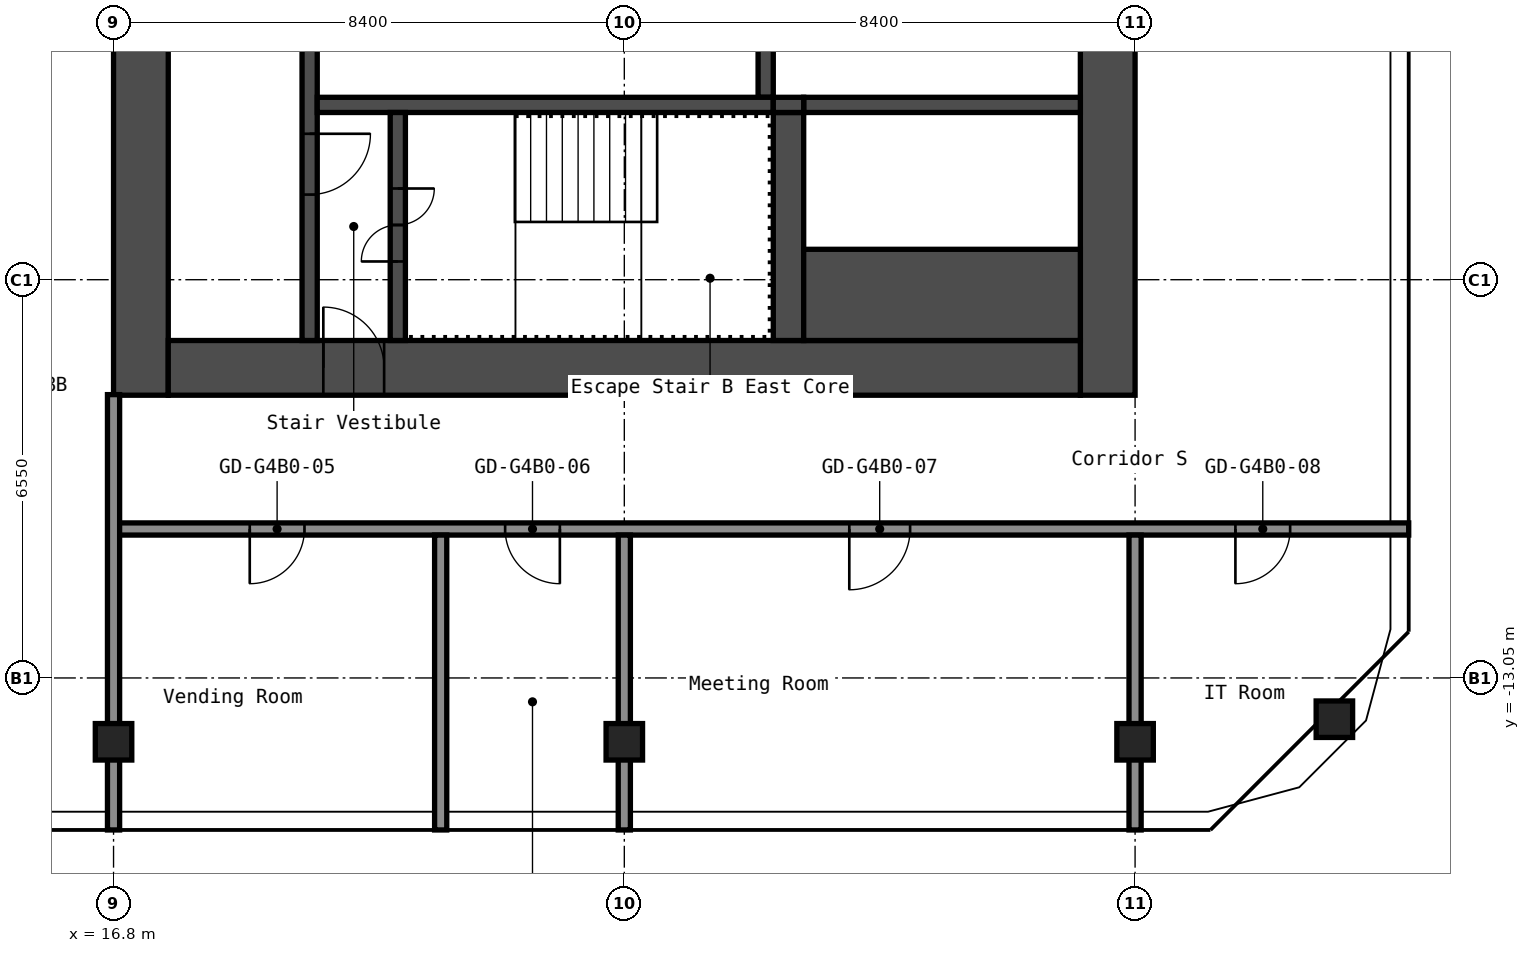
"""IFC4 building model, lengths in metres.
Left out: names, types, materials, properties, quantities, classifications, styles, units other than length and angle.
Written with IfcOpenShell. Run it as: python <this file> out.ifc"""

import sys

from ifc_helpers import new_model, si_unit, direction, frame, frame_2d, origin, origin_2d, place, context, subcontext, project, spatial, rectangle, hollow_rectangle, extrude, element, fill, save


model = new_model("IFC4")
c1 = context("Model", 3, precision=1e-05, world=origin(), true_north=direction((0.0, 1.0)))
c2 = subcontext(c1, "Body", "Model", "MODEL_VIEW")
j1 = project(units=[si_unit("LENGTHUNIT", "METRE"), si_unit("PLANEANGLEUNIT", "RADIAN")], contexts=[c1])
p1 = place(None, origin())
s1 = spatial("IfcSite", under=j1, at=p1, CompositionType="ELEMENT")
p2 = place(p1, origin())
s2 = spatial("IfcBuilding", under=s1, at=p2, CompositionType="ELEMENT")
p3 = place(p2, frame((0.0, 0.0, 189.8)))
s3 = spatial("IfcBuildingStorey", under=s2, at=p3, CompositionType="ELEMENT", Elevation=189.8)
for number, where, z_axis, x_axis in (
    (1, (16.8, -14.1, 0.0), (0.0, 0.0, 1.0), (1.0, 0.0, 0.0)),
    (2, (25.2, -14.1, 0.0), (0.0, 0.0, 1.0), (1.0, 0.0, 0.0)),
    (3, (33.6, -14.1, 0.0), (0.0, 0.0, 1.0), (1.0, 0.0, 0.0)),
    (4, (36.878, -13.729, 0.0), (0.0, 0.0, 1.0), (1.0, 0.0, 0.0)),
):
    element("IfcColumn", number, at=place(p3, frame(where, z_axis=z_axis, x_axis=x_axis)), inside=s3, PredefinedType="COLUMN", context=c2, shape_type="SweptSolid", body=[
        extrude(hollow_rectangle(XDim=0.6, YDim=0.6, WallThickness=0.025, InnerFilletRadius=0.038, OuterFilletRadius=0.062, at=origin_2d()), origin(), (0.0, 0.0, 1.0), 2.75),
    ])
p4 = place(p3, frame((17.25, -8.4, 0.0), z_axis=(0.0, 0.0, 1.0), x_axis=(0.0, 1.0, 0.0)))
e5 = element("IfcWall", 5, at=p4, inside=s3, PredefinedType="SHEAR", context=c2, shape_type="SweptSolid", body=[
    extrude(rectangle(XDim=16.8, YDim=0.9, at=frame_2d((8.4, 0.0))), origin(), (0.0, 0.0, 1.0), 2.75),
])
p5 = place(p4, frame((10.1, 0.0, 0.0)))
e6 = element("IfcOpeningElement", 6, at=p5, cuts=e5, PredefinedType="OPENING", context=c2, shape_type="SweptSolid", body=[
    extrude(rectangle(XDim=1.6, YDim=2.1, at=frame_2d((0.8, 1.05))), frame((0.0, 0.46, 0.0), z_axis=(0.0, -1.0, 0.0), x_axis=(1.0, 0.0, 0.0)), (0.0, 0.0, 1.0), 0.92),
])
p6 = place(p3, frame((33.15, -8.4, 0.0), z_axis=(0.0, 0.0, 1.0), x_axis=(0.0, 1.0, 0.0)))
e7 = element("IfcWall", 7, at=p6, inside=s3, PredefinedType="SHEAR", context=c2, shape_type="SweptSolid", body=[
    extrude(rectangle(XDim=16.8, YDim=0.9, at=frame_2d((8.4, 0.0))), origin(), (0.0, 0.0, 1.0), 2.75),
])
p7 = place(p3, frame((17.7, -7.95, 0.0), z_axis=(0.0, 0.0, 1.0), x_axis=(1.0, 0.0, 0.0)))
e8 = element("IfcWall", 8, at=p7, inside=s3, PredefinedType="SHEAR", context=c2, shape_type="SweptSolid", body=[
    extrude(rectangle(XDim=15.0, YDim=0.9, at=frame_2d((7.5, 0.0))), origin(), (0.0, 0.0, 1.0), 2.75),
])
p8 = place(p7, frame((2.55, 0.0, 0.0)))
e9 = element("IfcOpeningElement", 9, at=p8, cuts=e8, PredefinedType="OPENING", context=c2, shape_type="SweptSolid", body=[
    extrude(rectangle(XDim=1.0, YDim=2.1, at=frame_2d((0.5, 1.05))), frame((0.0, 0.46, 0.0), z_axis=(0.0, -1.0, 0.0), x_axis=(1.0, 0.0, 0.0)), (0.0, 0.0, 1.0), 0.92),
])
p9 = place(p3, frame((20.025, -7.5, 0.0), z_axis=(0.0, 0.0, 1.0), x_axis=(0.0, 1.0, 0.0)))
e10 = element("IfcWall", 10, at=p9, inside=s3, PredefinedType="SHEAR", context=c2, shape_type="SweptSolid", body=[
    extrude(rectangle(XDim=6.3, YDim=0.25, at=frame_2d((3.15, 0.0))), origin(), (0.0, 0.0, 1.0), 2.75),
])
p10 = place(p9, frame((2.4, 0.0, 0.0)))
e11 = element("IfcOpeningElement", 11, at=p10, cuts=e10, PredefinedType="OPENING", context=c2, shape_type="SweptSolid", body=[
    extrude(rectangle(XDim=1.0, YDim=2.1, at=frame_2d((0.5, 1.05))), frame((0.0, 0.135, 0.0), z_axis=(0.0, -1.0, 0.0), x_axis=(1.0, 0.0, 0.0)), (0.0, 0.0, 1.0), 0.27),
])
p11 = place(p3, frame((27.525, -3.5, 0.0), z_axis=(0.0, 0.0, 1.0), x_axis=(0.0, 1.0, 0.0)))
e12 = element("IfcWall", 12, at=p11, inside=s3, PredefinedType="SHEAR", context=c2, shape_type="SweptSolid", body=[
    extrude(rectangle(XDim=2.05, YDim=0.25, at=frame_2d((1.025, 0.0))), origin(), (0.0, 0.0, 1.0), 2.75),
])
p12 = place(p3, frame((20.15, -3.625, 0.0), z_axis=(0.0, 0.0, 1.0), x_axis=(1.0, 0.0, 0.0)))
e13 = element("IfcWall", 13, at=p12, inside=s3, PredefinedType="SHEAR", context=c2, shape_type="SweptSolid", body=[
    extrude(rectangle(XDim=7.5, YDim=0.25, at=frame_2d((3.75, 0.0))), origin(), (0.0, 0.0, 1.0), 2.75),
])
p13 = place(p3, frame((21.475, -7.5, 0.0), z_axis=(0.0, 0.0, 1.0), x_axis=(0.0, 1.0, 0.0)))
e14 = element("IfcWall", 14, at=p13, inside=s3, PredefinedType="SHEAR", context=c2, shape_type="SweptSolid", body=[
    extrude(rectangle(XDim=3.75, YDim=0.25, at=frame_2d((1.875, 0.0))), origin(), (0.0, 0.0, 1.0), 2.75),
])
p14 = place(p13, frame((1.3, 0.0, 0.0)))
e15 = element("IfcOpeningElement", 15, at=p14, cuts=e14, PredefinedType="OPENING", context=c2, shape_type="SweptSolid", body=[
    extrude(rectangle(XDim=1.2, YDim=2.1, at=frame_2d((0.6, 1.05))), frame((0.0, 0.135, 0.0), z_axis=(0.0, -1.0, 0.0), x_axis=(1.0, 0.0, 0.0)), (0.0, 0.0, 1.0), 0.27),
])
p15 = place(p3, frame((27.9, -7.5, 0.0), z_axis=(0.0, 0.0, 1.0), x_axis=(0.0, 1.0, 0.0)))
e16 = element("IfcWall", 16, at=p15, inside=s3, PredefinedType="SHEAR", context=c2, shape_type="SweptSolid", body=[
    extrude(rectangle(XDim=3.75, YDim=0.5, at=frame_2d((1.875, 0.0))), origin(), (0.0, 0.0, 1.0), 2.75),
])
p16 = place(p3, frame((28.15, -3.625, 0.0), z_axis=(0.0, 0.0, 1.0), x_axis=(1.0, 0.0, 0.0)))
e17 = element("IfcWall", 17, at=p16, inside=s3, PredefinedType="SHEAR", context=c2, shape_type="SweptSolid", body=[
    extrude(rectangle(XDim=4.55, YDim=0.25, at=frame_2d((2.275, 0.0))), origin(), (0.0, 0.0, 1.0), 2.75),
])
p17 = place(p3, frame((28.15, -6.75, 0.0), z_axis=(0.0, 0.0, 1.0), x_axis=(1.0, 0.0, 0.0)))
e18 = element("IfcWall", 18, at=p17, inside=s3, PredefinedType="SHEAR", context=c2, shape_type="SweptSolid", body=[
    extrude(rectangle(XDim=4.55, YDim=1.5, at=frame_2d((2.275, 0.0))), origin(), (0.0, 0.0, 1.0), 2.75),
])
p18 = place(p3, frame((27.65, -3.625, 0.0), z_axis=(0.0, 0.0, 1.0), x_axis=(1.0, 0.0, 0.0)))
e19 = element("IfcWall", 19, at=p18, inside=s3, PredefinedType="SHEAR", context=c2, shape_type="SweptSolid", body=[
    extrude(rectangle(XDim=0.5, YDim=0.25, at=frame_2d((0.25, 0.0))), origin(), (0.0, 0.0, 1.0), 2.75),
])
p19 = place(p3, frame((16.8, -10.6, 0.0), z_axis=(0.0, 0.0, 1.0), x_axis=(1.0, 0.0, 0.0)))
e20 = element("IfcWall", 20, at=p19, inside=s3, PredefinedType="PARTITIONING", context=c2, shape_type="SweptSolid", body=[
    extrude(rectangle(XDim=21.3, YDim=0.2, at=frame_2d((10.65, 0.0))), origin(), (0.0, 0.0, 1.0), 2.75),
])
p20 = place(p19, frame((2.24, 0.0, 0.0)))
e21 = element("IfcOpeningElement", 21, at=p20, cuts=e20, PredefinedType="OPENING", context=c2, shape_type="SweptSolid", body=[
    extrude(rectangle(XDim=0.9, YDim=2.1, at=frame_2d((0.45, 1.05))), frame((0.0, 0.11, 0.0), z_axis=(0.0, -1.0, 0.0), x_axis=(1.0, 0.0, 0.0)), (0.0, 0.0, 1.0), 0.22),
])
p21 = place(p19, frame((6.44, 0.0, 0.0)))
e22 = element("IfcOpeningElement", 22, at=p21, cuts=e20, PredefinedType="OPENING", context=c2, shape_type="SweptSolid", body=[
    extrude(rectangle(XDim=0.9, YDim=2.1, at=frame_2d((0.45, 1.05))), frame((0.0, 0.11, 0.0), z_axis=(0.0, -1.0, 0.0), x_axis=(1.0, 0.0, 0.0)), (0.0, 0.0, 1.0), 0.22),
])
p22 = place(p19, frame((12.1, 0.0, 0.0)))
e23 = element("IfcOpeningElement", 23, at=p22, cuts=e20, PredefinedType="OPENING", context=c2, shape_type="SweptSolid", body=[
    extrude(rectangle(XDim=1.0, YDim=2.1, at=frame_2d((0.5, 1.05))), frame((0.0, 0.11, 0.0), z_axis=(0.0, -1.0, 0.0), x_axis=(1.0, 0.0, 0.0)), (0.0, 0.0, 1.0), 0.22),
])
p23 = place(p19, frame((18.45, 0.0, 0.0)))
e24 = element("IfcOpeningElement", 24, at=p23, cuts=e20, PredefinedType="OPENING", context=c2, shape_type="SweptSolid", body=[
    extrude(rectangle(XDim=0.9, YDim=2.1, at=frame_2d((0.45, 1.05))), frame((0.0, 0.11, 0.0), z_axis=(0.0, -1.0, 0.0), x_axis=(1.0, 0.0, 0.0)), (0.0, 0.0, 1.0), 0.22),
])
p24 = place(p3, frame((16.8, -15.55, 0.0), z_axis=(0.0, 0.0, 1.0), x_axis=(0.0, 1.0, 0.0)))
e25 = element("IfcWall", 25, at=p24, inside=s3, PredefinedType="PARTITIONING", context=c2, shape_type="SweptSolid", body=[
    extrude(rectangle(XDim=7.16, YDim=0.2, at=frame_2d((3.58, 0.0))), origin(), (0.0, 0.0, 1.0), 2.75),
])
for number, where, z_axis, x_axis in (
    (26, (22.18, -15.55, 0.0), (0.0, 0.0, 1.0), (0.0, 1.0, 0.0)),
    (27, (25.2, -15.55, 0.0), (0.0, 0.0, 1.0), (0.0, 1.0, 0.0)),
    (28, (33.6, -15.55, 0.0), (0.0, 0.0, 1.0), (0.0, 1.0, 0.0)),
):
    element("IfcWall", number, at=place(p3, frame(where, z_axis=z_axis, x_axis=x_axis)), inside=s3, PredefinedType="PARTITIONING", context=c2, shape_type="SweptSolid", body=[
        extrude(rectangle(XDim=4.85, YDim=0.2, at=frame_2d((2.425, 0.0))), origin(), (0.0, 0.0, 1.0), 2.75),
    ])
p25 = place(p8, origin())
e29 = element("IfcDoor", 29, at=p25, inside=s3, OperationType="SINGLE_SWING_RIGHT", PredefinedType="DOOR", context=c2, shape_type="SweptSolid", body=[
    extrude(rectangle(XDim=1.0, YDim=2.1, at=frame_2d((0.5, 1.05))), frame((0.0, 0.025, 0.0), z_axis=(0.0, -1.0, 0.0), x_axis=(1.0, 0.0, 0.0)), (0.0, 0.0, 1.0), 0.05),
])
fill(e9, e29)
p26 = place(p14, origin())
e30 = element("IfcDoor", 30, at=p26, inside=s3, OperationType="DOUBLE_DOOR_SINGLE_SWING", PredefinedType="DOOR", context=c2, shape_type="SweptSolid", body=[
    extrude(rectangle(XDim=1.2, YDim=2.1, at=frame_2d((0.6, 1.05))), frame((0.0, 0.025, 0.0), z_axis=(0.0, -1.0, 0.0), x_axis=(1.0, 0.0, 0.0)), (0.0, 0.0, 1.0), 0.05),
])
fill(e15, e30)
p27 = place(p10, origin())
e31 = element("IfcDoor", 31, at=p27, inside=s3, OperationType="SINGLE_SWING_RIGHT", PredefinedType="DOOR", context=c2, shape_type="SweptSolid", body=[
    extrude(rectangle(XDim=1.0, YDim=2.1, at=frame_2d((0.5, 1.05))), frame((0.0, 0.025, 0.0), z_axis=(0.0, -1.0, 0.0), x_axis=(1.0, 0.0, 0.0)), (0.0, 0.0, 1.0), 0.05),
])
fill(e11, e31)
p28 = place(p20, origin())
e32 = element("IfcDoor", 32, at=p28, inside=s3, OperationType="SINGLE_SWING_LEFT", PredefinedType="DOOR", context=c2, shape_type="SweptSolid", body=[
    extrude(rectangle(XDim=0.9, YDim=2.1, at=frame_2d((0.45, 1.05))), frame((0.0, 0.025, 0.0), z_axis=(0.0, -1.0, 0.0), x_axis=(1.0, 0.0, 0.0)), (0.0, 0.0, 1.0), 0.05),
])
fill(e21, e32)
p29 = place(p21, origin())
e33 = element("IfcDoor", 33, at=p29, inside=s3, OperationType="SINGLE_SWING_RIGHT", PredefinedType="DOOR", context=c2, shape_type="SweptSolid", body=[
    extrude(rectangle(XDim=0.9, YDim=2.1, at=frame_2d((0.45, 1.05))), frame((0.0, 0.025, 0.0), z_axis=(0.0, -1.0, 0.0), x_axis=(1.0, 0.0, 0.0)), (0.0, 0.0, 1.0), 0.05),
])
fill(e22, e33)
p30 = place(p22, origin())
e34 = element("IfcDoor", 34, at=p30, inside=s3, OperationType="SINGLE_SWING_LEFT", PredefinedType="DOOR", context=c2, shape_type="SweptSolid", body=[
    extrude(rectangle(XDim=1.0, YDim=2.1, at=frame_2d((0.5, 1.05))), frame((0.0, 0.025, 0.0), z_axis=(0.0, -1.0, 0.0), x_axis=(1.0, 0.0, 0.0)), (0.0, 0.0, 1.0), 0.05),
])
fill(e23, e34)
p31 = place(p23, origin())
e35 = element("IfcDoor", 35, at=p31, inside=s3, OperationType="SINGLE_SWING_LEFT", PredefinedType="DOOR", context=c2, shape_type="SweptSolid", body=[
    extrude(rectangle(XDim=0.9, YDim=2.1, at=frame_2d((0.45, 1.05))), frame((0.0, 0.025, 0.0), z_axis=(0.0, -1.0, 0.0), x_axis=(1.0, 0.0, 0.0)), (0.0, 0.0, 1.0), 0.05),
])
fill(e24, e35)
save(model, sys.argv[1])
